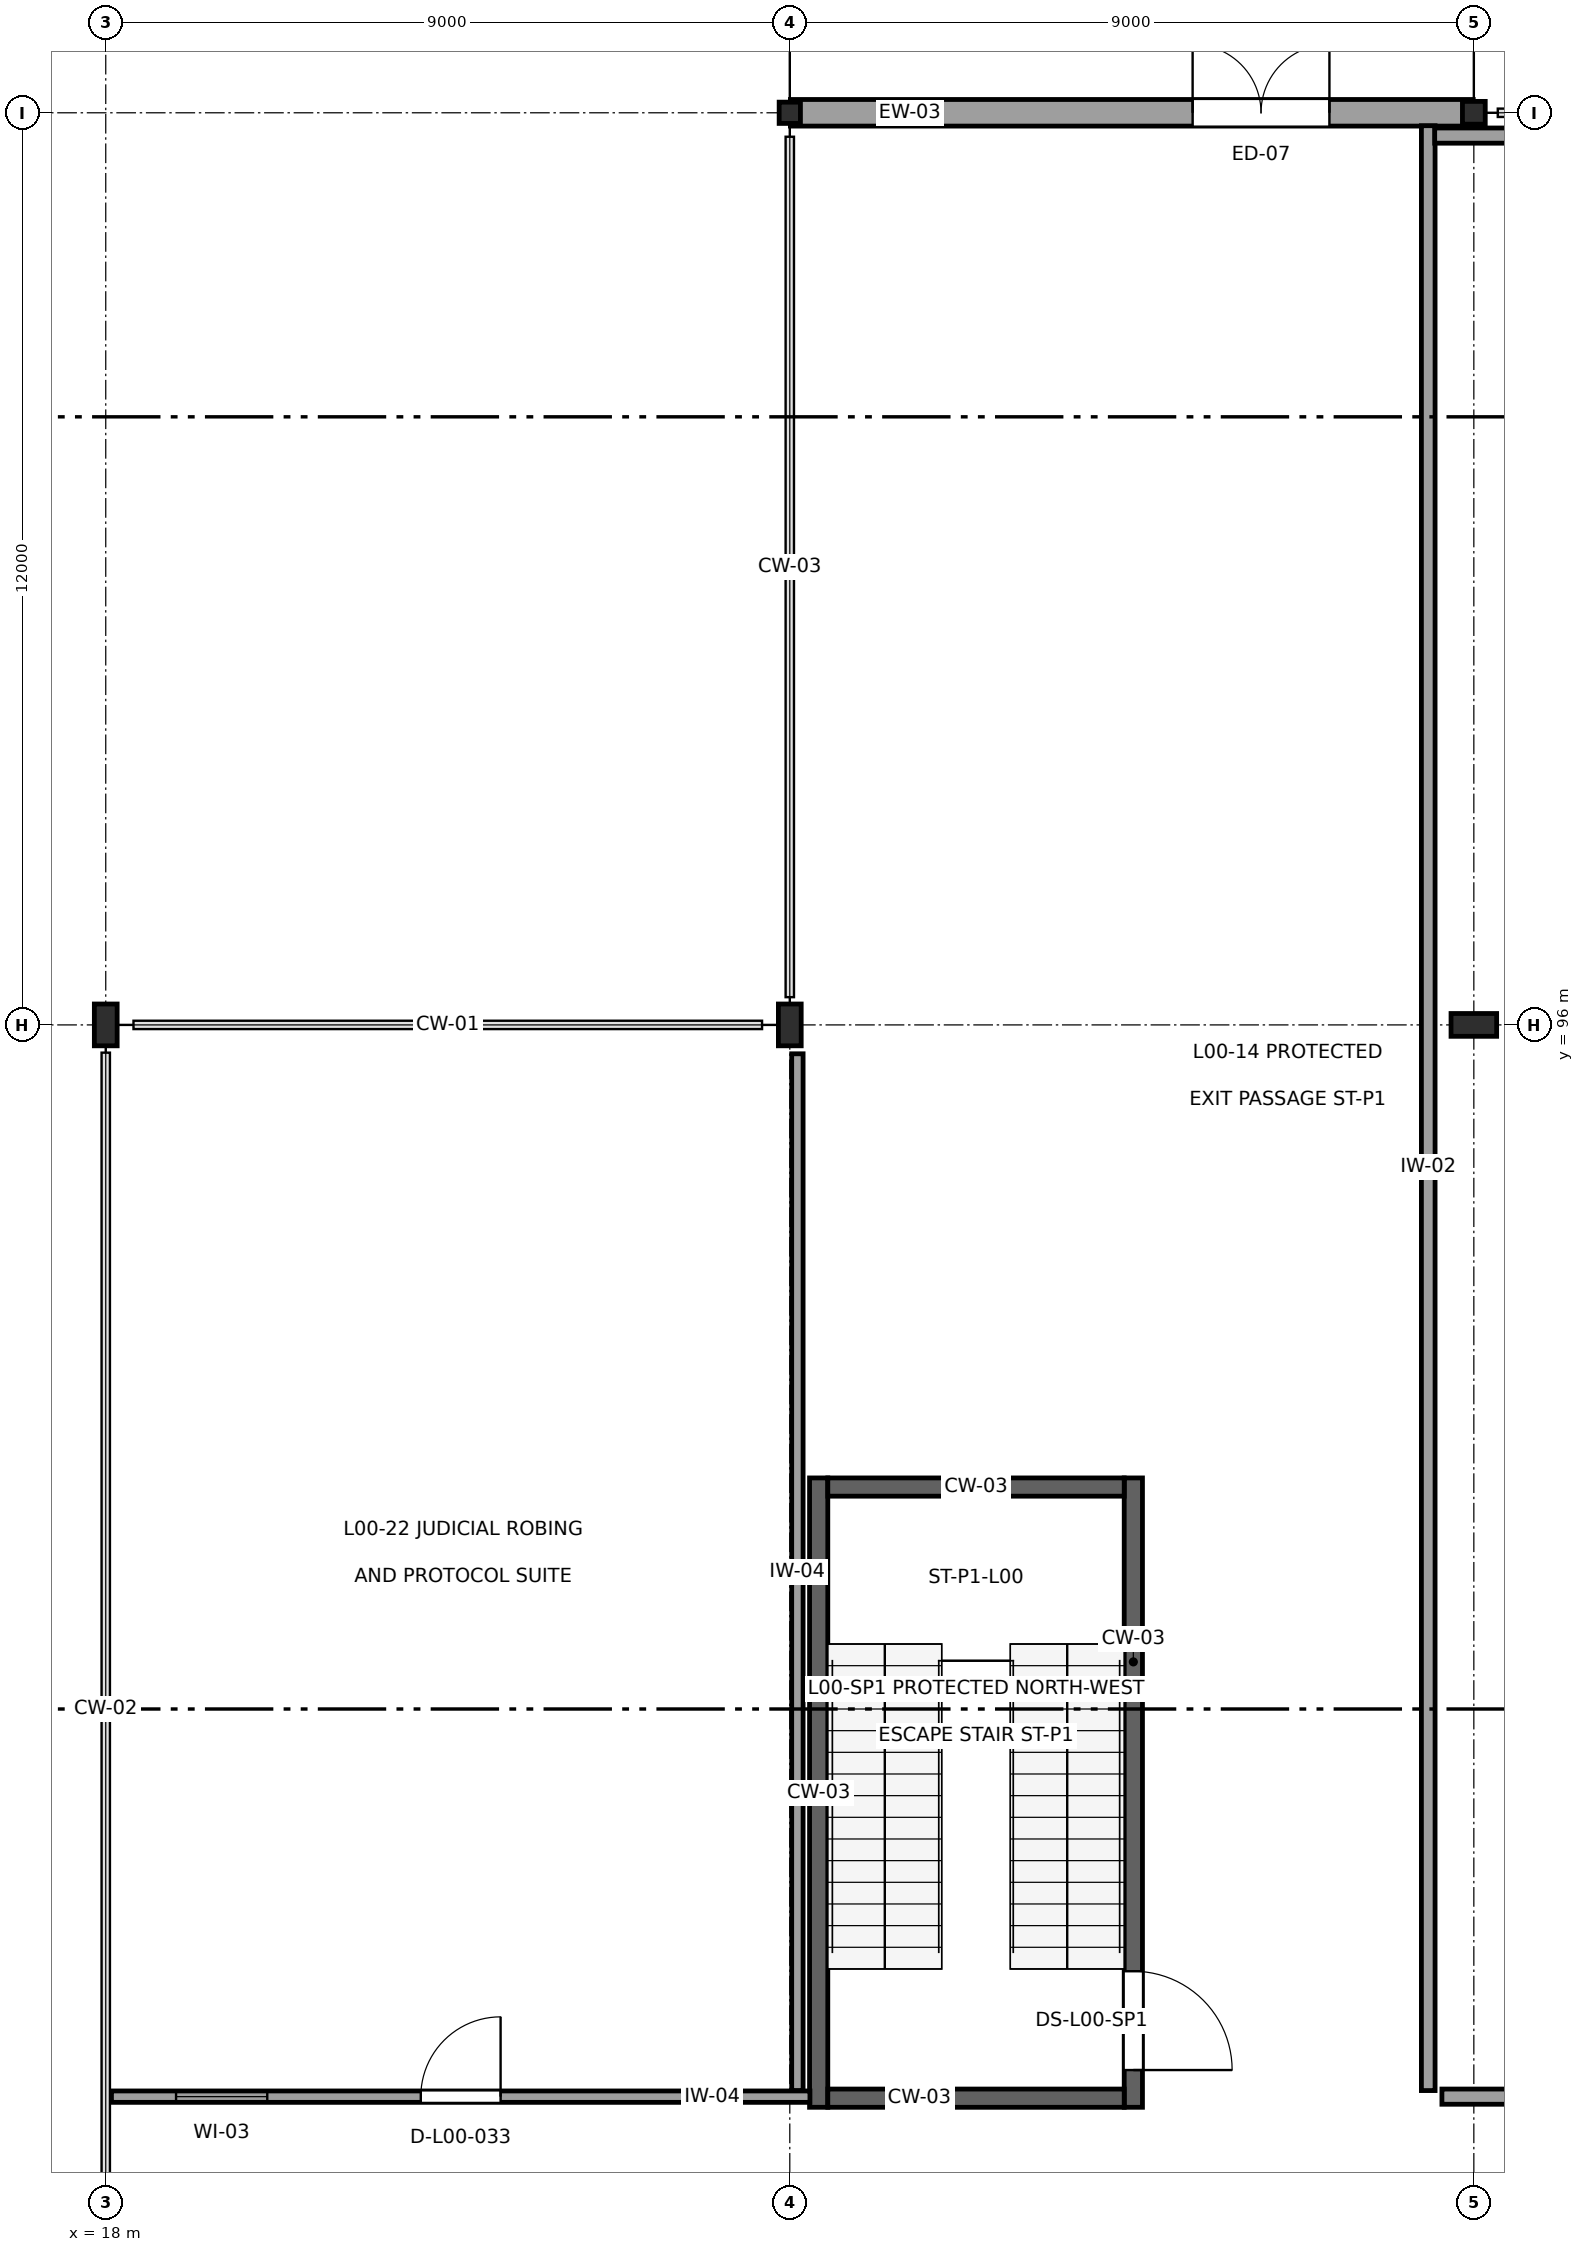
"""IFC4 building model, lengths in metres.
Left out: names, types, materials, properties, quantities, classifications, styles, units other than length and angle.
Written with IfcOpenShell. Run it as: python <this file> out.ifc"""

import sys

from ifc_helpers import new_model, si_unit, direction, frame, frame_2d, origin, origin_2d, place, context, subcontext, project, spatial, rectangle, i_section, extrude, element, fill, save


model = new_model("IFC4")
c1 = context("Model", 3, precision=1e-05, world=origin(), true_north=direction((0.0, 1.0)))
c2 = subcontext(c1, "Body", "Model", "MODEL_VIEW")
j1 = project(units=[si_unit("LENGTHUNIT", "METRE"), si_unit("PLANEANGLEUNIT", "RADIAN")], contexts=[c1])
p1 = place(None, origin())
s1 = spatial("IfcSite", under=j1, at=p1, CompositionType="ELEMENT")
p2 = place(p1, origin())
s2 = spatial("IfcBuilding", under=s1, at=p2, CompositionType="ELEMENT")
p3 = place(p2, origin())
s3 = spatial("IfcBuildingStorey", under=s2, at=p3, CompositionType="ELEMENT", Elevation=0.0)
for number, where, z_axis, x_axis in (
    (1, (18.0, 96.0, 0.0), (0.0, 0.0, 1.0), (1.0, 0.0, 0.0)),
    (2, (27.0, 96.0, 0.0), (0.0, 0.0, 1.0), (1.0, 0.0, 0.0)),
):
    element("IfcColumn", number, at=place(p3, frame(where, z_axis=z_axis, x_axis=x_axis)), inside=s3, PredefinedType="COLUMN", context=c2, shape_type="SweptSolid", body=[
        extrude(i_section(OverallWidth=0.3, OverallDepth=0.55, WebThickness=0.015, FlangeThickness=0.029, at=origin_2d()), origin(), (0.0, 0.0, 1.0), 5.4),
    ])
p4 = place(p3, frame((27.0, 108.0, 0.0), z_axis=(0.0, 0.0, 1.0), x_axis=(1.0, 0.0, 0.0)))
e3 = element("IfcColumn", 3, at=p4, inside=s3, PredefinedType="COLUMN", context=c2, shape_type="SweptSolid", body=[
    extrude(i_section(OverallWidth=0.28, OverallDepth=0.28, WebThickness=0.01, FlangeThickness=0.018, at=origin_2d()), origin(), (0.0, 0.0, 1.0), 5.4),
])
p5 = place(p3, frame((36.0, 96.0, 0.0), z_axis=(0.0, 0.0, 1.0), x_axis=(0.0, 1.0, 0.0)))
e4 = element("IfcColumn", 4, at=p5, inside=s3, PredefinedType="COLUMN", context=c2, shape_type="SweptSolid", body=[
    extrude(i_section(OverallWidth=0.3, OverallDepth=0.6, WebThickness=0.015, FlangeThickness=0.03, at=origin_2d()), origin(), (0.0, 0.0, 1.0), 5.4),
])
p6 = place(p3, frame((36.0, 108.0, 0.0), z_axis=(0.0, 0.0, 1.0), x_axis=(1.0, 0.0, 0.0)))
e5 = element("IfcColumn", 5, at=p6, inside=s3, PredefinedType="COLUMN", context=c2, shape_type="SweptSolid", body=[
    extrude(i_section(OverallWidth=0.3, OverallDepth=0.3, WebThickness=0.011, FlangeThickness=0.019, at=origin_2d()), origin(), (0.0, 0.0, 1.0), 5.4),
])
p7 = place(p3, frame((35.992, 108.0, 0.0), z_axis=(0.0, 0.0, 1.0), x_axis=(-1.0, 0.0, 0.0)))
e6 = element("IfcWall", 6, at=p7, inside=s3, PredefinedType="SOLIDWALL", context=c2, shape_type="SweptSolid", body=[
    extrude(rectangle(XDim=8.984, YDim=0.35, at=frame_2d((4.492, 0.0))), origin(), (0.0, 0.0, 1.0), 4.535),
])
p8 = place(p7, frame((1.892, 0.0, 0.0)))
e7 = element("IfcOpeningElement", 7, at=p8, cuts=e6, PredefinedType="OPENING", context=c2, shape_type="SweptSolid", body=[
    extrude(rectangle(XDim=1.8, YDim=2.4, at=frame_2d((0.9, 1.2))), frame((0.0, 0.19, 0.0), z_axis=(0.0, -1.0, 0.0), x_axis=(1.0, 0.0, 0.0)), (0.0, 0.0, 1.0), 0.38),
])
p9 = place(p3, frame((27.38, 81.76, 0.0), z_axis=(0.0, 0.0, 1.0), x_axis=(0.0, 1.0, 0.0)))
e8 = element("IfcWall", 8, at=p9, inside=s3, PredefinedType="SHEAR", context=c2, shape_type="SweptSolid", body=[
    extrude(rectangle(XDim=8.28, YDim=0.24, at=frame_2d((4.14, 0.0))), origin(), (0.0, 0.0, 1.0), 5.21),
])
p10 = place(p3, frame((31.52, 81.76, 0.0), z_axis=(0.0, 0.0, 1.0), x_axis=(0.0, 1.0, 0.0)))
e9 = element("IfcWall", 9, at=p10, inside=s3, PredefinedType="SHEAR", context=c2, shape_type="SweptSolid", body=[
    extrude(rectangle(XDim=8.28, YDim=0.24, at=frame_2d((4.14, 0.0))), origin(), (0.0, 0.0, 1.0), 5.21),
])
p11 = place(p10, frame((0.49, 0.0, 0.0)))
e10 = element("IfcOpeningElement", 10, at=p11, cuts=e9, PredefinedType="OPENING", context=c2, shape_type="SweptSolid", body=[
    extrude(rectangle(XDim=1.3, YDim=2.2, at=frame_2d((0.65, 1.1))), frame((0.0, 0.135, 0.0), z_axis=(0.0, -1.0, 0.0), x_axis=(1.0, 0.0, 0.0)), (0.0, 0.0, 1.0), 0.27),
])
for number, where, z_axis, x_axis in (
    (11, (27.5, 81.88, 0.0), (0.0, 0.0, 1.0), (1.0, 0.0, 0.0)),
    (12, (27.5, 89.92, 0.0), (0.0, 0.0, 1.0), (1.0, 0.0, 0.0)),
):
    element("IfcWall", number, at=place(p3, frame(where, z_axis=z_axis, x_axis=x_axis)), inside=s3, PredefinedType="SHEAR", context=c2, shape_type="SweptSolid", body=[
        extrude(rectangle(XDim=3.9, YDim=0.24, at=frame_2d((1.95, 0.0))), origin(), (0.0, 0.0, 1.0), 5.21),
    ])
p12 = place(p3, frame((35.4, 107.83, 0.0), z_axis=(0.0, 0.0, 1.0), x_axis=(0.0, -1.0, 0.0)))
e13 = element("IfcWall", 13, at=p12, inside=s3, PredefinedType="PARTITIONING", context=c2, shape_type="SweptSolid", body=[
    extrude(rectangle(XDim=25.85, YDim=0.18, at=frame_2d((12.925, 0.0))), origin(), (0.0, 0.0, 1.0), 5.04),
])
p13 = place(p3, frame((72.12, 81.9, 0.0), z_axis=(0.0, 0.0, 1.0), x_axis=(-1.0, 0.0, 0.0)))
e14 = element("IfcWall", 14, at=p13, inside=s3, PredefinedType="PARTITIONING", context=c2, shape_type="SweptSolid", body=[
    extrude(rectangle(XDim=36.54, YDim=0.2, at=frame_2d((18.27, 0.0))), origin(), (0.0, 0.0, 1.0), 5.04),
])
p14 = place(p13, frame((17.32, 0.0, 0.0)))
e15 = element("IfcOpeningElement", 15, at=p14, cuts=e14, PredefinedType="OPENING", context=c2, shape_type="SweptSolid", body=[
    extrude(rectangle(XDim=1.9, YDim=2.5, at=frame_2d((0.95, 1.25))), frame((0.0, 0.115, 0.0), z_axis=(0.0, -1.0, 0.0), x_axis=(1.0, 0.0, 0.0)), (0.0, 0.0, 1.0), 0.23),
])
p15 = place(p13, frame((34.19, 0.0, 1.05)))
e16 = element("IfcOpeningElement", 16, at=p15, cuts=e14, PredefinedType="OPENING", context=c2, shape_type="SweptSolid", body=[
    extrude(rectangle(XDim=1.5, YDim=1.1, at=frame_2d((0.75, 0.55))), frame((0.0, 0.115, 0.0), z_axis=(0.0, -1.0, 0.0), x_axis=(1.0, 0.0, 0.0)), (0.0, 0.0, 1.0), 0.23),
])
p16 = place(p3, frame((35.485, 107.7, 0.0), z_axis=(0.0, 0.0, 1.0), x_axis=(1.0, 0.0, 0.0)))
e17 = element("IfcWall", 17, at=p16, inside=s3, PredefinedType="PARTITIONING", context=c2, shape_type="SweptSolid", body=[
    extrude(rectangle(XDim=45.035, YDim=0.2, at=frame_2d((22.518, 0.0))), origin(), (0.0, 0.0, 1.0), 5.04),
])
p17 = place(p3, frame((27.1, 95.62, 0.0), z_axis=(0.0, 0.0, 1.0), x_axis=(0.0, -1.0, 0.0)))
e18 = element("IfcWall", 18, at=p17, inside=s3, PredefinedType="PARTITIONING", context=c2, shape_type="SweptSolid", body=[
    extrude(rectangle(XDim=13.64, YDim=0.15, at=frame_2d((6.82, 0.0))), origin(), (0.0, 0.0, 1.0), 4.275),
])
p18 = place(p3, frame((27.265, 81.9, 0.0), z_axis=(0.0, 0.0, 1.0), x_axis=(-1.0, 0.0, 0.0)))
e19 = element("IfcWall", 19, at=p18, inside=s3, PredefinedType="PARTITIONING", context=c2, shape_type="SweptSolid", body=[
    extrude(rectangle(XDim=9.19, YDim=0.15, at=frame_2d((4.595, 0.0))), origin(), (0.0, 0.0, 1.0), 5.04),
])
p19 = place(p18, frame((4.07, 0.0, 0.0)))
e20 = element("IfcOpeningElement", 20, at=p19, cuts=e19, PredefinedType="OPENING", context=c2, shape_type="SweptSolid", body=[
    extrude(rectangle(XDim=1.05, YDim=2.25, at=frame_2d((0.525, 1.125))), frame((0.0, 0.09, 0.0), z_axis=(0.0, -1.0, 0.0), x_axis=(1.0, 0.0, 0.0)), (0.0, 0.0, 1.0), 0.18),
])
p20 = place(p18, frame((7.14, 0.0, 1.05)))
e21 = element("IfcOpeningElement", 21, at=p20, cuts=e19, PredefinedType="OPENING", context=c2, shape_type="SweptSolid", body=[
    extrude(rectangle(XDim=1.2, YDim=1.0, at=frame_2d((0.6, 0.5))), frame((0.0, 0.09, 0.0), z_axis=(0.0, -1.0, 0.0), x_axis=(1.0, 0.0, 0.0)), (0.0, 0.0, 1.0), 0.18),
])
p21 = place(p8, frame((1.8, 0.0, 0.0), z_axis=(0.0, 0.0, 1.0), x_axis=(-1.0, 0.0, 0.0)))
e22 = element("IfcDoor", 22, at=p21, inside=s3, OperationType="DOUBLE_DOOR_SINGLE_SWING", PredefinedType="DOOR", context=c2, shape_type="SweptSolid", body=[
    extrude(rectangle(XDim=1.8, YDim=2.4, at=frame_2d((0.9, 1.2))), frame((0.0, 0.025, 0.0), z_axis=(0.0, -1.0, 0.0), x_axis=(1.0, 0.0, 0.0)), (0.0, 0.0, 1.0), 0.05),
])
fill(e7, e22)
p22 = place(p11, frame((1.3, 0.0, 0.0), z_axis=(0.0, 0.0, 1.0), x_axis=(-1.0, 0.0, 0.0)))
e23 = element("IfcDoor", 23, at=p22, inside=s3, OperationType="SINGLE_SWING_LEFT", PredefinedType="DOOR", context=c2, shape_type="SweptSolid", body=[
    extrude(rectangle(XDim=1.3, YDim=2.2, at=frame_2d((0.65, 1.1))), frame((0.0, 0.025, 0.0), z_axis=(0.0, -1.0, 0.0), x_axis=(1.0, 0.0, 0.0)), (0.0, 0.0, 1.0), 0.05),
])
fill(e10, e23)
p23 = place(p19, frame((1.05, 0.0, 0.0), z_axis=(0.0, 0.0, 1.0), x_axis=(-1.0, 0.0, 0.0)))
e24 = element("IfcDoor", 24, at=p23, inside=s3, OperationType="SINGLE_SWING_LEFT", PredefinedType="DOOR", context=c2, shape_type="SweptSolid", body=[
    extrude(rectangle(XDim=1.05, YDim=2.25, at=frame_2d((0.525, 1.125))), frame((0.0, 0.025, 0.0), z_axis=(0.0, -1.0, 0.0), x_axis=(1.0, 0.0, 0.0)), (0.0, 0.0, 1.0), 0.05),
])
fill(e20, e24)
p24 = place(p20, origin())
e25 = element("IfcWindow", 25, at=p24, inside=s3, PartitioningType="SINGLE_PANEL", PredefinedType="WINDOW", context=c2, shape_type="SweptSolid", body=[
    extrude(rectangle(XDim=1.2, YDim=1.0, at=frame_2d((0.6, 0.5))), frame((0.0, 0.03, 0.0), z_axis=(0.0, -1.0, 0.0), x_axis=(1.0, 0.0, 0.0)), (0.0, 0.0, 1.0), 0.06),
])
fill(e21, e25)
save(model, sys.argv[1])
